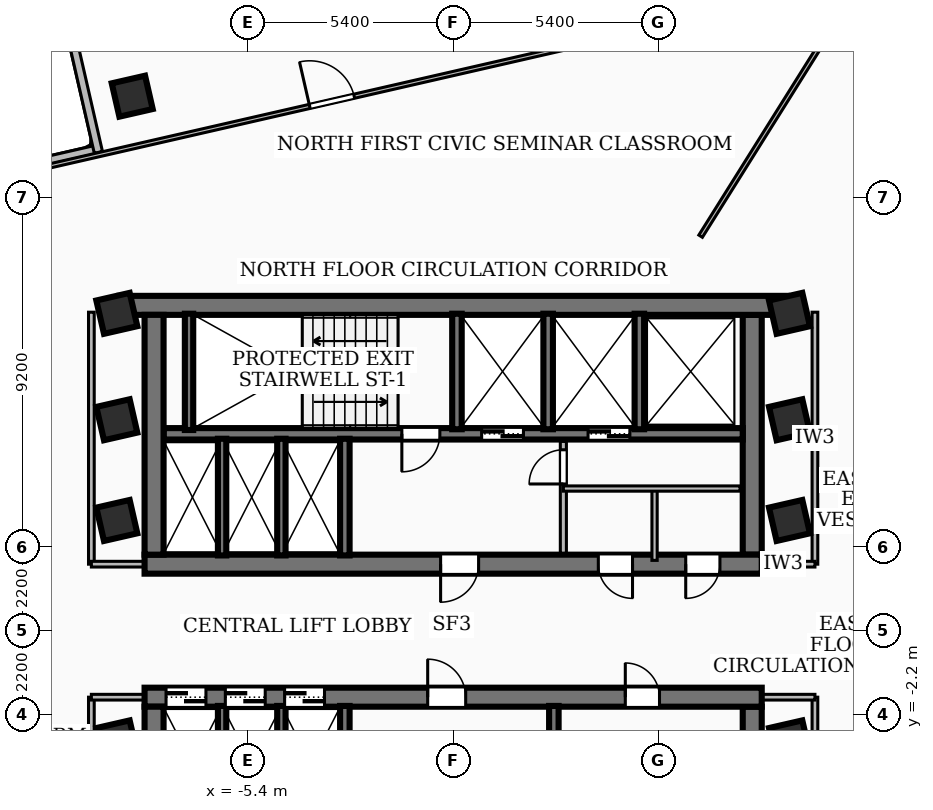
"""IFC4 building model, lengths in metres.
Left out: names, types, materials, properties, quantities, classifications, styles, units other than length and angle.
Written with IfcOpenShell. Run it as: python <this file> out.ifc"""

import sys

from ifc_helpers import new_model, si_unit, direction, frame, frame_2d, origin, origin_2d, place, context, subcontext, project, spatial, rectangle, extrude, element, fill, save


model = new_model("IFC4")
c1 = context("Model", 3, precision=1e-05, world=origin(), true_north=direction((0.0, 1.0)))
c2 = subcontext(c1, "Body", "Model", "MODEL_VIEW")
j1 = project(units=[si_unit("LENGTHUNIT", "METRE"), si_unit("PLANEANGLEUNIT", "RADIAN")], contexts=[c1])
p1 = place(None, origin())
s1 = spatial("IfcSite", under=j1, at=p1, CompositionType="ELEMENT")
p2 = place(p1, origin())
s2 = spatial("IfcBuilding", under=s1, at=p2, CompositionType="ELEMENT")
p3 = place(p2, frame((0.0, 0.0, 119.88)))
s3 = spatial("IfcBuildingStorey", under=s2, at=p3, CompositionType="ELEMENT", Elevation=119.88)
p4 = place(p3, frame((-8.78, 8.56, 0.0), z_axis=(0.0, 0.0, 1.0), x_axis=(1.0, 0.0, 0.0)))
e1 = element("IfcWall", 1, at=p4, inside=s3, PredefinedType="SHEAR", context=c2, shape_type="SweptSolid", body=[
    extrude(rectangle(XDim=17.56, YDim=0.5, at=frame_2d((8.78, 0.0))), origin(), (0.0, 0.0, 1.0), 3.34),
])
p5 = place(p3, frame((8.12, 1.75, 0.0), z_axis=(0.0, 0.0, 1.0), x_axis=(-1.0, 0.0, 0.0)))
e2 = element("IfcWall", 2, at=p5, inside=s3, PredefinedType="SHEAR", context=c2, shape_type="SweptSolid", body=[
    extrude(rectangle(XDim=16.24, YDim=0.5, at=frame_2d((8.12, 0.0))), origin(), (0.0, 0.0, 1.0), 3.34),
])
p6 = place(p5, frame((7.45, 0.0, 0.0)))
e3 = element("IfcOpeningElement", 3, at=p6, cuts=e2, PredefinedType="OPENING", context=c2, shape_type="SweptSolid", body=[
    extrude(rectangle(XDim=1.0, YDim=2.1, at=frame_2d((0.5, 1.05))), frame((0.0, 0.26, 0.0), z_axis=(0.0, -1.0, 0.0), x_axis=(1.0, 0.0, 0.0)), (0.0, 0.0, 1.0), 0.52),
])
p7 = place(p5, frame((3.4, 0.0, 0.0)))
e4 = element("IfcOpeningElement", 4, at=p7, cuts=e2, PredefinedType="OPENING", context=c2, shape_type="SweptSolid", body=[
    extrude(rectangle(XDim=0.9, YDim=2.06, at=frame_2d((0.45, 1.03))), frame((0.0, 0.26, 0.0), z_axis=(0.0, -1.0, 0.0), x_axis=(1.0, 0.0, 0.0)), (0.0, 0.0, 1.0), 0.52),
])
p8 = place(p5, frame((1.1, 0.0, 0.0)))
e5 = element("IfcOpeningElement", 5, at=p8, cuts=e2, PredefinedType="OPENING", context=c2, shape_type="SweptSolid", body=[
    extrude(rectangle(XDim=0.9, YDim=2.06, at=frame_2d((0.45, 1.03))), frame((0.0, 0.26, 0.0), z_axis=(0.0, -1.0, 0.0), x_axis=(1.0, 0.0, 0.0)), (0.0, 0.0, 1.0), 0.52),
])
for number, where, z_axis, x_axis in (
    (6, (-7.87, 2.0, 0.0), (0.0, 0.0, 1.0), (0.0, 1.0, 0.0)),
    (7, (7.87, 8.31, 0.0), (0.0, 0.0, 1.0), (0.0, -1.0, 0.0)),
):
    element("IfcWall", number, at=place(p3, frame(where, z_axis=z_axis, x_axis=x_axis)), inside=s3, PredefinedType="SHEAR", context=c2, shape_type="SweptSolid", body=[
        extrude(rectangle(XDim=6.31, YDim=0.5, at=frame_2d((3.155, 0.0))), origin(), (0.0, 0.0, 1.0), 3.34),
    ])
p9 = place(p3, frame((7.62, 5.18, 0.0), z_axis=(0.0, 0.0, 1.0), x_axis=(-1.0, 0.0, 0.0)))
e8 = element("IfcWall", 8, at=p9, inside=s3, PredefinedType="SOLIDWALL", context=c2, shape_type="SweptSolid", body=[
    extrude(rectangle(XDim=15.24, YDim=0.3, at=frame_2d((7.62, 0.0))), origin(), (0.0, 0.0, 1.0), 3.34),
])
p10 = place(p9, frame((5.77, 0.0, 0.0)))
e9 = element("IfcOpeningElement", 9, at=p10, cuts=e8, PredefinedType="OPENING", context=c2, shape_type="SweptSolid", body=[
    extrude(rectangle(XDim=1.1, YDim=2.15, at=frame_2d((0.55, 1.075))), frame((0.0, 0.16, 0.0), z_axis=(0.0, -1.0, 0.0), x_axis=(1.0, 0.0, 0.0)), (0.0, 0.0, 1.0), 0.32),
])
p11 = place(p9, frame((2.97, 0.0, 0.0)))
e10 = element("IfcOpeningElement", 10, at=p11, cuts=e8, PredefinedType="OPENING", context=c2, shape_type="SweptSolid", body=[
    extrude(rectangle(XDim=1.1, YDim=2.15, at=frame_2d((0.55, 1.075))), frame((0.0, 0.16, 0.0), z_axis=(0.0, -1.0, 0.0), x_axis=(1.0, 0.0, 0.0)), (0.0, 0.0, 1.0), 0.32),
])
p12 = place(p9, frame((7.97, 0.0, 0.0)))
e11 = element("IfcOpeningElement", 11, at=p12, cuts=e8, PredefinedType="OPENING", context=c2, shape_type="SweptSolid", body=[
    extrude(rectangle(XDim=1.0, YDim=2.1, at=frame_2d((0.5, 1.05))), frame((0.0, 0.16, 0.0), z_axis=(0.0, -1.0, 0.0), x_axis=(1.0, 0.0, 0.0)), (0.0, 0.0, 1.0), 0.32),
])
p13 = place(p3, frame((-8.12, -1.75, 0.0), z_axis=(0.0, 0.0, 1.0), x_axis=(1.0, 0.0, 0.0)))
e12 = element("IfcWall", 12, at=p13, inside=s3, PredefinedType="SHEAR", context=c2, shape_type="SweptSolid", body=[
    extrude(rectangle(XDim=16.24, YDim=0.5, at=frame_2d((8.12, 0.0))), origin(), (0.0, 0.0, 1.0), 3.34),
])
p14 = place(p13, frame((7.45, 0.0, 0.0)))
e13 = element("IfcOpeningElement", 13, at=p14, cuts=e12, PredefinedType="OPENING", context=c2, shape_type="SweptSolid", body=[
    extrude(rectangle(XDim=1.0, YDim=2.1, at=frame_2d((0.5, 1.05))), frame((0.0, 0.26, 0.0), z_axis=(0.0, -1.0, 0.0), x_axis=(1.0, 0.0, 0.0)), (0.0, 0.0, 1.0), 0.52),
])
p15 = place(p13, frame((12.65, 0.0, 0.0)))
e14 = element("IfcOpeningElement", 14, at=p15, cuts=e12, PredefinedType="OPENING", context=c2, shape_type="SweptSolid", body=[
    extrude(rectangle(XDim=0.9, YDim=2.06, at=frame_2d((0.45, 1.03))), frame((0.0, 0.26, 0.0), z_axis=(0.0, -1.0, 0.0), x_axis=(1.0, 0.0, 0.0)), (0.0, 0.0, 1.0), 0.52),
])
p16 = place(p13, frame((0.565, 0.0, 0.0)))
e15 = element("IfcOpeningElement", 15, at=p16, cuts=e12, PredefinedType="OPENING", context=c2, shape_type="SweptSolid", body=[
    extrude(rectangle(XDim=1.05, YDim=2.15, at=frame_2d((0.525, 1.075))), frame((0.0, 0.26, 0.0), z_axis=(0.0, -1.0, 0.0), x_axis=(1.0, 0.0, 0.0)), (0.0, 0.0, 1.0), 0.52),
])
p17 = place(p13, frame((2.125, 0.0, 0.0)))
e16 = element("IfcOpeningElement", 16, at=p17, cuts=e12, PredefinedType="OPENING", context=c2, shape_type="SweptSolid", body=[
    extrude(rectangle(XDim=1.05, YDim=2.15, at=frame_2d((0.525, 1.075))), frame((0.0, 0.26, 0.0), z_axis=(0.0, -1.0, 0.0), x_axis=(1.0, 0.0, 0.0)), (0.0, 0.0, 1.0), 0.52),
])
p18 = place(p13, frame((3.685, 0.0, 0.0)))
e17 = element("IfcOpeningElement", 17, at=p18, cuts=e12, PredefinedType="OPENING", context=c2, shape_type="SweptSolid", body=[
    extrude(rectangle(XDim=1.05, YDim=2.15, at=frame_2d((0.525, 1.075))), frame((0.0, 0.26, 0.0), z_axis=(0.0, -1.0, 0.0), x_axis=(1.0, 0.0, 0.0)), (0.0, 0.0, 1.0), 0.52),
])
for number, where, z_axis, x_axis in (
    (18, (-7.87, -8.31, 0.0), (0.0, 0.0, 1.0), (0.0, 1.0, 0.0)),
    (19, (7.87, -2.0, 0.0), (0.0, 0.0, 1.0), (0.0, -1.0, 0.0)),
):
    element("IfcWall", number, at=place(p3, frame(where, z_axis=z_axis, x_axis=x_axis)), inside=s3, PredefinedType="SHEAR", context=c2, shape_type="SweptSolid", body=[
        extrude(rectangle(XDim=6.31, YDim=0.5, at=frame_2d((3.155, 0.0))), origin(), (0.0, 0.0, 1.0), 3.34),
    ])
p19 = place(p3, frame((-6.95, 5.28, 0.0), z_axis=(0.0, 0.0, 1.0), x_axis=(0.0, 1.0, 0.0)))
e20 = element("IfcWall", 20, at=p19, inside=s3, PredefinedType="SOLIDWALL", context=c2, shape_type="SweptSolid", body=[
    extrude(rectangle(XDim=3.06, YDim=0.22, at=frame_2d((1.53, 0.0))), origin(), (0.0, 0.0, 1.0), 3.34),
])
for number, where, z_axis, x_axis in (
    (21, (0.1, 5.3, 0.0), (0.0, 0.0, 1.0), (0.0, 1.0, 0.0)),
    (22, (2.5, 5.3, 0.0), (0.0, 0.0, 1.0), (0.0, 1.0, 0.0)),
    (23, (4.9, 5.3, 0.0), (0.0, 0.0, 1.0), (0.0, 1.0, 0.0)),
):
    element("IfcWall", number, at=place(p3, frame(where, z_axis=z_axis, x_axis=x_axis)), inside=s3, PredefinedType="SOLIDWALL", context=c2, shape_type="SweptSolid", body=[
        extrude(rectangle(XDim=3.04, YDim=0.25, at=frame_2d((1.52, 0.0))), origin(), (0.0, 0.0, 1.0), 3.34),
    ])
for number, where, z_axis, x_axis in (
    (24, (-2.85, 1.98, 0.0), (0.0, 0.0, 1.0), (0.0, 1.0, 0.0)),
    (25, (-2.85, -5.05, 0.0), (0.0, 0.0, 1.0), (0.0, 1.0, 0.0)),
    (26, (2.65, -5.05, 0.0), (0.0, 0.0, 1.0), (0.0, 1.0, 0.0)),
):
    element("IfcWall", number, at=place(p3, frame(where, z_axis=z_axis, x_axis=x_axis)), inside=s3, PredefinedType="SOLIDWALL", context=c2, shape_type="SweptSolid", body=[
        extrude(rectangle(XDim=3.07, YDim=0.25, at=frame_2d((1.535, 0.0))), origin(), (0.0, 0.0, 1.0), 3.34),
    ])
for number, where, z_axis, x_axis in (
    (27, (-6.08, 1.98, 0.0), (0.0, 0.0, 1.0), (0.0, 1.0, 0.0)),
    (28, (-4.52, 1.98, 0.0), (0.0, 0.0, 1.0), (0.0, 1.0, 0.0)),
    (29, (-6.08, -5.05, 0.0), (0.0, 0.0, 1.0), (0.0, 1.0, 0.0)),
    (30, (-4.52, -5.05, 0.0), (0.0, 0.0, 1.0), (0.0, 1.0, 0.0)),
):
    element("IfcWall", number, at=place(p3, frame(where, z_axis=z_axis, x_axis=x_axis)), inside=s3, PredefinedType="SOLIDWALL", context=c2, shape_type="SweptSolid", body=[
        extrude(rectangle(XDim=3.07, YDim=0.22, at=frame_2d((1.535, 0.0))), origin(), (0.0, 0.0, 1.0), 3.34),
    ])
for number, where, z_axis, x_axis in (
    (31, (-8.85, -2.9, 0.0), (0.0, 0.0, 1.0), (0.975, 0.223, 0.0)),
    (32, (-8.85, 2.9, 0.0), (0.0, 0.0, 1.0), (0.975, 0.223, 0.0)),
    (33, (-8.85, 5.55, 0.0), (0.0, 0.0, 1.0), (0.975, 0.223, 0.0)),
    (34, (8.85, -2.9, 0.0), (0.0, 0.0, 1.0), (0.975, 0.223, 0.0)),
    (35, (8.85, 2.9, 0.0), (0.0, 0.0, 1.0), (0.975, 0.223, 0.0)),
    (36, (8.85, 5.55, 0.0), (0.0, 0.0, 1.0), (0.975, 0.223, 0.0)),
    (37, (-8.85, 8.35, 0.0), (0.0, 0.0, 1.0), (0.975, 0.223, 0.0)),
    (38, (8.85, 8.35, 0.0), (0.0, 0.0, 1.0), (0.975, 0.223, 0.0)),
    (39, (-8.445, 14.064, 0.0), (0.0, 0.0, 1.0), (0.975, 0.223, 0.0)),
):
    element("IfcColumn", number, at=place(p3, frame(where, z_axis=z_axis, x_axis=x_axis)), inside=s3, PredefinedType="COLUMN", context=c2, shape_type="SweptSolid", body=[
        extrude(rectangle(XDim=0.9, YDim=0.9, at=origin_2d()), origin(), (0.0, 0.0, 1.0), 3.6),
    ])
p20 = place(p3, frame((-15.857, 11.182, 0.0), z_axis=(0.0, 0.0, 1.0), x_axis=(0.974754598481, 0.223278912438, 0.0)))
e40 = element("IfcWall", 40, at=p20, inside=s3, PredefinedType="SOLIDWALL", context=c2, shape_type="SweptSolid", body=[
    extrude(rectangle(XDim=6.759, YDim=0.22, at=frame_2d((3.379, 0.0))), origin(), (0.0, 0.0, 1.0), 3.34),
])
p21 = place(p3, frame((-9.335, 12.585, 0.0), z_axis=(0.0, 0.0, 1.0), x_axis=(-0.22331741435, 0.974745778369, 0.0)))
e41 = element("IfcWall", 41, at=p21, inside=s3, PredefinedType="SOLIDWALL", context=c2, shape_type="SweptSolid", body=[
    extrude(rectangle(XDim=10.859, YDim=0.22, at=frame_2d((5.43, 0.0))), origin(), (0.0, 0.0, 1.0), 3.34),
])
p22 = place(p21, frame((3.85, 0.0, 0.85)))
e42 = element("IfcOpeningElement", 42, at=p22, cuts=e41, PredefinedType="OPENING", context=c2, shape_type="SweptSolid", body=[
    extrude(rectangle(XDim=2.7, YDim=1.65, at=frame_2d((1.35, 0.825))), frame((0.0, 0.12, 0.0), z_axis=(0.0, -1.0, 0.0), x_axis=(1.0, 0.0, 0.0)), (0.0, 0.0, 1.0), 0.24),
])
p23 = place(p3, frame((2.9, 2.04, 0.0), z_axis=(0.0, 0.0, 1.0), x_axis=(0.0, 1.0, 0.0)))
e43 = element("IfcWall", 43, at=p23, inside=s3, PredefinedType="PARTITIONING", context=c2, shape_type="SweptSolid", body=[
    extrude(rectangle(XDim=2.94, YDim=0.16, at=frame_2d((1.47, 0.0))), origin(), (0.0, 0.0, 1.0), 2.57),
])
p24 = place(p23, frame((1.82, 0.0, 0.0)))
e44 = element("IfcOpeningElement", 44, at=p24, cuts=e43, PredefinedType="OPENING", context=c2, shape_type="SweptSolid", body=[
    extrude(rectangle(XDim=0.9, YDim=2.06, at=frame_2d((0.45, 1.03))), frame((0.0, 0.09, 0.0), z_axis=(0.0, -1.0, 0.0), x_axis=(1.0, 0.0, 0.0)), (0.0, 0.0, 1.0), 0.18),
])
p25 = place(p3, frame((2.9, 3.74, 0.0), z_axis=(0.0, 0.0, 1.0), x_axis=(1.0, 0.0, 0.0)))
e45 = element("IfcWall", 45, at=p25, inside=s3, PredefinedType="PARTITIONING", context=c2, shape_type="SweptSolid", body=[
    extrude(rectangle(XDim=4.65, YDim=0.138, at=frame_2d((2.325, 0.0))), origin(), (0.0, 0.0, 1.0), 3.34),
])
p26 = place(p3, frame((5.3, 1.85, 0.0), z_axis=(0.0, 0.0, 1.0), x_axis=(0.0, 1.0, 0.0)))
e46 = element("IfcWall", 46, at=p26, inside=s3, PredefinedType="PARTITIONING", context=c2, shape_type="SweptSolid", body=[
    extrude(rectangle(XDim=1.89, YDim=0.138, at=frame_2d((0.945, 0.0))), origin(), (0.0, 0.0, 1.0), 2.57),
])
p27 = place(p3, frame((-9.52, 1.75, 0.0), z_axis=(0.0, 0.0, 1.0), x_axis=(0.0, 1.0, 0.0)))
e47 = element("IfcWall", 47, at=p27, inside=s3, PredefinedType="PARTITIONING", context=c2, shape_type="SweptSolid", body=[
    extrude(rectangle(XDim=6.63, YDim=0.15, at=frame_2d((3.315, 0.0))), origin(), (0.0, 0.0, 1.0), 2.57),
])
p28 = place(p3, frame((-7.85, 1.75, 0.0), z_axis=(0.0, 0.0, 1.0), x_axis=(-1.0, 0.0, 0.0)))
e48 = element("IfcWall", 48, at=p28, inside=s3, PredefinedType="PARTITIONING", context=c2, shape_type="SweptSolid", body=[
    extrude(rectangle(XDim=1.67, YDim=0.15, at=frame_2d((0.835, 0.0))), origin(), (0.0, 0.0, 1.0), 2.57),
])
p29 = place(p3, frame((-9.52, -8.38, 0.0), z_axis=(0.0, 0.0, 1.0), x_axis=(0.0, 1.0, 0.0)))
e49 = element("IfcWall", 49, at=p29, inside=s3, PredefinedType="PARTITIONING", context=c2, shape_type="SweptSolid", body=[
    extrude(rectangle(XDim=6.63, YDim=0.15, at=frame_2d((3.315, 0.0))), origin(), (0.0, 0.0, 1.0), 2.57),
])
p30 = place(p3, frame((-7.85, -1.75, 0.0), z_axis=(0.0, 0.0, 1.0), x_axis=(-1.0, 0.0, 0.0)))
e50 = element("IfcWall", 50, at=p30, inside=s3, PredefinedType="PARTITIONING", context=c2, shape_type="SweptSolid", body=[
    extrude(rectangle(XDim=1.67, YDim=0.15, at=frame_2d((0.835, 0.0))), origin(), (0.0, 0.0, 1.0), 2.57),
])
p31 = place(p3, frame((9.52, 1.75, 0.0), z_axis=(0.0, 0.0, 1.0), x_axis=(0.0, 1.0, 0.0)))
e51 = element("IfcWall", 51, at=p31, inside=s3, PredefinedType="PARTITIONING", context=c2, shape_type="SweptSolid", body=[
    extrude(rectangle(XDim=6.63, YDim=0.15, at=frame_2d((3.315, 0.0))), origin(), (0.0, 0.0, 1.0), 2.57),
])
p32 = place(p3, frame((7.85, 1.75, 0.0), z_axis=(0.0, 0.0, 1.0), x_axis=(1.0, 0.0, 0.0)))
e52 = element("IfcWall", 52, at=p32, inside=s3, PredefinedType="PARTITIONING", context=c2, shape_type="SweptSolid", body=[
    extrude(rectangle(XDim=1.67, YDim=0.15, at=frame_2d((0.835, 0.0))), origin(), (0.0, 0.0, 1.0), 2.57),
])
p33 = place(p3, frame((9.52, -8.38, 0.0), z_axis=(0.0, 0.0, 1.0), x_axis=(0.0, 1.0, 0.0)))
e53 = element("IfcWall", 53, at=p33, inside=s3, PredefinedType="PARTITIONING", context=c2, shape_type="SweptSolid", body=[
    extrude(rectangle(XDim=6.63, YDim=0.15, at=frame_2d((3.315, 0.0))), origin(), (0.0, 0.0, 1.0), 2.57),
])
p34 = place(p3, frame((7.85, -1.75, 0.0), z_axis=(0.0, 0.0, 1.0), x_axis=(1.0, 0.0, 0.0)))
e54 = element("IfcWall", 54, at=p34, inside=s3, PredefinedType="PARTITIONING", context=c2, shape_type="SweptSolid", body=[
    extrude(rectangle(XDim=1.67, YDim=0.15, at=frame_2d((0.835, 0.0))), origin(), (0.0, 0.0, 1.0), 2.57),
])
p35 = place(p3, frame((6.512, 10.38, 0.0), z_axis=(0.0, 0.0, 1.0), x_axis=(0.531323053356, 0.847169294163, 0.0)))
e55 = element("IfcWall", 55, at=p35, inside=s3, PredefinedType="PARTITIONING", context=c2, shape_type="SweptSolid", body=[
    extrude(rectangle(XDim=7.421, YDim=0.11, at=frame_2d((3.711, 0.0))), origin(), (0.0, 0.0, 1.0), 2.57),
])
p36 = place(p3, frame((-12.957, 11.692, 0.0), z_axis=(0.0, 0.0, 1.0), x_axis=(0.97475845088, 0.223262093598, 0.0)))
e56 = element("IfcWall", 56, at=p36, inside=s3, PredefinedType="PARTITIONING", context=c2, shape_type="SweptSolid", body=[
    extrude(rectangle(XDim=20.04, YDim=0.11, at=frame_2d((10.02, 0.0))), origin(), (0.0, 0.0, 1.0), 2.57),
])
p37 = place(p36, frame((9.42, 0.0, 0.0)))
e57 = element("IfcOpeningElement", 57, at=p37, cuts=e56, PredefinedType="OPENING", context=c2, shape_type="SweptSolid", body=[
    extrude(rectangle(XDim=1.2, YDim=2.1, at=frame_2d((0.6, 1.05))), frame((0.0, 0.065, 0.0), z_axis=(0.0, -1.0, 0.0), x_axis=(1.0, 0.0, 0.0)), (0.0, 0.0, 1.0), 0.13),
])
p38 = place(p6, origin())
e58 = element("IfcDoor", 58, at=p38, inside=s3, OperationType="SINGLE_SWING_RIGHT", PredefinedType="DOOR", context=c2, shape_type="SweptSolid", body=[
    extrude(rectangle(XDim=1.0, YDim=2.1, at=frame_2d((0.5, 1.05))), frame((0.0, 0.025, 0.0), z_axis=(0.0, -1.0, 0.0), x_axis=(1.0, 0.0, 0.0)), (0.0, 0.0, 1.0), 0.05),
])
fill(e3, e58)
p39 = place(p14, origin())
e59 = element("IfcDoor", 59, at=p39, inside=s3, OperationType="SINGLE_SWING_LEFT", PredefinedType="DOOR", context=c2, shape_type="SweptSolid", body=[
    extrude(rectangle(XDim=1.0, YDim=2.1, at=frame_2d((0.5, 1.05))), frame((0.0, 0.025, 0.0), z_axis=(0.0, -1.0, 0.0), x_axis=(1.0, 0.0, 0.0)), (0.0, 0.0, 1.0), 0.05),
])
fill(e13, e59)
p40 = place(p10, origin())
e60 = element("IfcDoor", 60, at=p40, inside=s3, OperationType="DOUBLE_DOOR_SLIDING", PredefinedType="DOOR", context=c2, shape_type="SweptSolid", body=[
    extrude(rectangle(XDim=1.1, YDim=2.15, at=frame_2d((0.55, 1.075))), frame((0.0, 0.025, 0.0), z_axis=(0.0, -1.0, 0.0), x_axis=(1.0, 0.0, 0.0)), (0.0, 0.0, 1.0), 0.05),
])
fill(e9, e60)
p41 = place(p11, origin())
e61 = element("IfcDoor", 61, at=p41, inside=s3, OperationType="DOUBLE_DOOR_SLIDING", PredefinedType="DOOR", context=c2, shape_type="SweptSolid", body=[
    extrude(rectangle(XDim=1.1, YDim=2.15, at=frame_2d((0.55, 1.075))), frame((0.0, 0.025, 0.0), z_axis=(0.0, -1.0, 0.0), x_axis=(1.0, 0.0, 0.0)), (0.0, 0.0, 1.0), 0.05),
])
fill(e10, e61)
p42 = place(p12, origin())
e62 = element("IfcDoor", 62, at=p42, inside=s3, OperationType="SINGLE_SWING_RIGHT", PredefinedType="DOOR", context=c2, shape_type="SweptSolid", body=[
    extrude(rectangle(XDim=1.0, YDim=2.1, at=frame_2d((0.5, 1.05))), frame((0.0, 0.025, 0.0), z_axis=(0.0, -1.0, 0.0), x_axis=(1.0, 0.0, 0.0)), (0.0, 0.0, 1.0), 0.05),
])
fill(e11, e62)
p43 = place(p15, origin())
e63 = element("IfcDoor", 63, at=p43, inside=s3, OperationType="SINGLE_SWING_LEFT", PredefinedType="DOOR", context=c2, shape_type="SweptSolid", body=[
    extrude(rectangle(XDim=0.9, YDim=2.06, at=frame_2d((0.45, 1.03))), frame((0.0, 0.025, 0.0), z_axis=(0.0, -1.0, 0.0), x_axis=(1.0, 0.0, 0.0)), (0.0, 0.0, 1.0), 0.05),
])
fill(e14, e63)
p44 = place(p16, origin())
e64 = element("IfcDoor", 64, at=p44, inside=s3, OperationType="DOUBLE_DOOR_SLIDING", PredefinedType="DOOR", context=c2, shape_type="SweptSolid", body=[
    extrude(rectangle(XDim=1.05, YDim=2.15, at=frame_2d((0.525, 1.075))), frame((0.0, 0.025, 0.0), z_axis=(0.0, -1.0, 0.0), x_axis=(1.0, 0.0, 0.0)), (0.0, 0.0, 1.0), 0.05),
])
fill(e15, e64)
p45 = place(p17, origin())
e65 = element("IfcDoor", 65, at=p45, inside=s3, OperationType="DOUBLE_DOOR_SLIDING", PredefinedType="DOOR", context=c2, shape_type="SweptSolid", body=[
    extrude(rectangle(XDim=1.05, YDim=2.15, at=frame_2d((0.525, 1.075))), frame((0.0, 0.025, 0.0), z_axis=(0.0, -1.0, 0.0), x_axis=(1.0, 0.0, 0.0)), (0.0, 0.0, 1.0), 0.05),
])
fill(e16, e65)
p46 = place(p18, origin())
e66 = element("IfcDoor", 66, at=p46, inside=s3, OperationType="DOUBLE_DOOR_SLIDING", PredefinedType="DOOR", context=c2, shape_type="SweptSolid", body=[
    extrude(rectangle(XDim=1.05, YDim=2.15, at=frame_2d((0.525, 1.075))), frame((0.0, 0.025, 0.0), z_axis=(0.0, -1.0, 0.0), x_axis=(1.0, 0.0, 0.0)), (0.0, 0.0, 1.0), 0.05),
])
fill(e17, e66)
p47 = place(p7, origin())
e67 = element("IfcDoor", 67, at=p47, inside=s3, OperationType="SINGLE_SWING_LEFT", PredefinedType="DOOR", context=c2, shape_type="SweptSolid", body=[
    extrude(rectangle(XDim=0.9, YDim=2.06, at=frame_2d((0.45, 1.03))), frame((0.0, 0.025, 0.0), z_axis=(0.0, -1.0, 0.0), x_axis=(1.0, 0.0, 0.0)), (0.0, 0.0, 1.0), 0.05),
])
fill(e4, e67)
p48 = place(p8, origin())
e68 = element("IfcDoor", 68, at=p48, inside=s3, OperationType="SINGLE_SWING_RIGHT", PredefinedType="DOOR", context=c2, shape_type="SweptSolid", body=[
    extrude(rectangle(XDim=0.9, YDim=2.06, at=frame_2d((0.45, 1.03))), frame((0.0, 0.025, 0.0), z_axis=(0.0, -1.0, 0.0), x_axis=(1.0, 0.0, 0.0)), (0.0, 0.0, 1.0), 0.05),
])
fill(e5, e68)
p49 = place(p24, origin())
e69 = element("IfcDoor", 69, at=p49, inside=s3, OperationType="SINGLE_SWING_LEFT", PredefinedType="DOOR", context=c2, shape_type="SweptSolid", body=[
    extrude(rectangle(XDim=0.9, YDim=2.06, at=frame_2d((0.45, 1.03))), frame((0.0, 0.025, 0.0), z_axis=(0.0, -1.0, 0.0), x_axis=(1.0, 0.0, 0.0)), (0.0, 0.0, 1.0), 0.05),
])
fill(e44, e69)
p50 = place(p37, origin())
e70 = element("IfcDoor", 70, at=p50, inside=s3, OperationType="SINGLE_SWING_LEFT", PredefinedType="DOOR", context=c2, shape_type="SweptSolid", body=[
    extrude(rectangle(XDim=1.2, YDim=2.1, at=frame_2d((0.6, 1.05))), frame((0.0, 0.025, 0.0), z_axis=(0.0, -1.0, 0.0), x_axis=(1.0, 0.0, 0.0)), (0.0, 0.0, 1.0), 0.05),
])
fill(e57, e70)
save(model, sys.argv[1])
